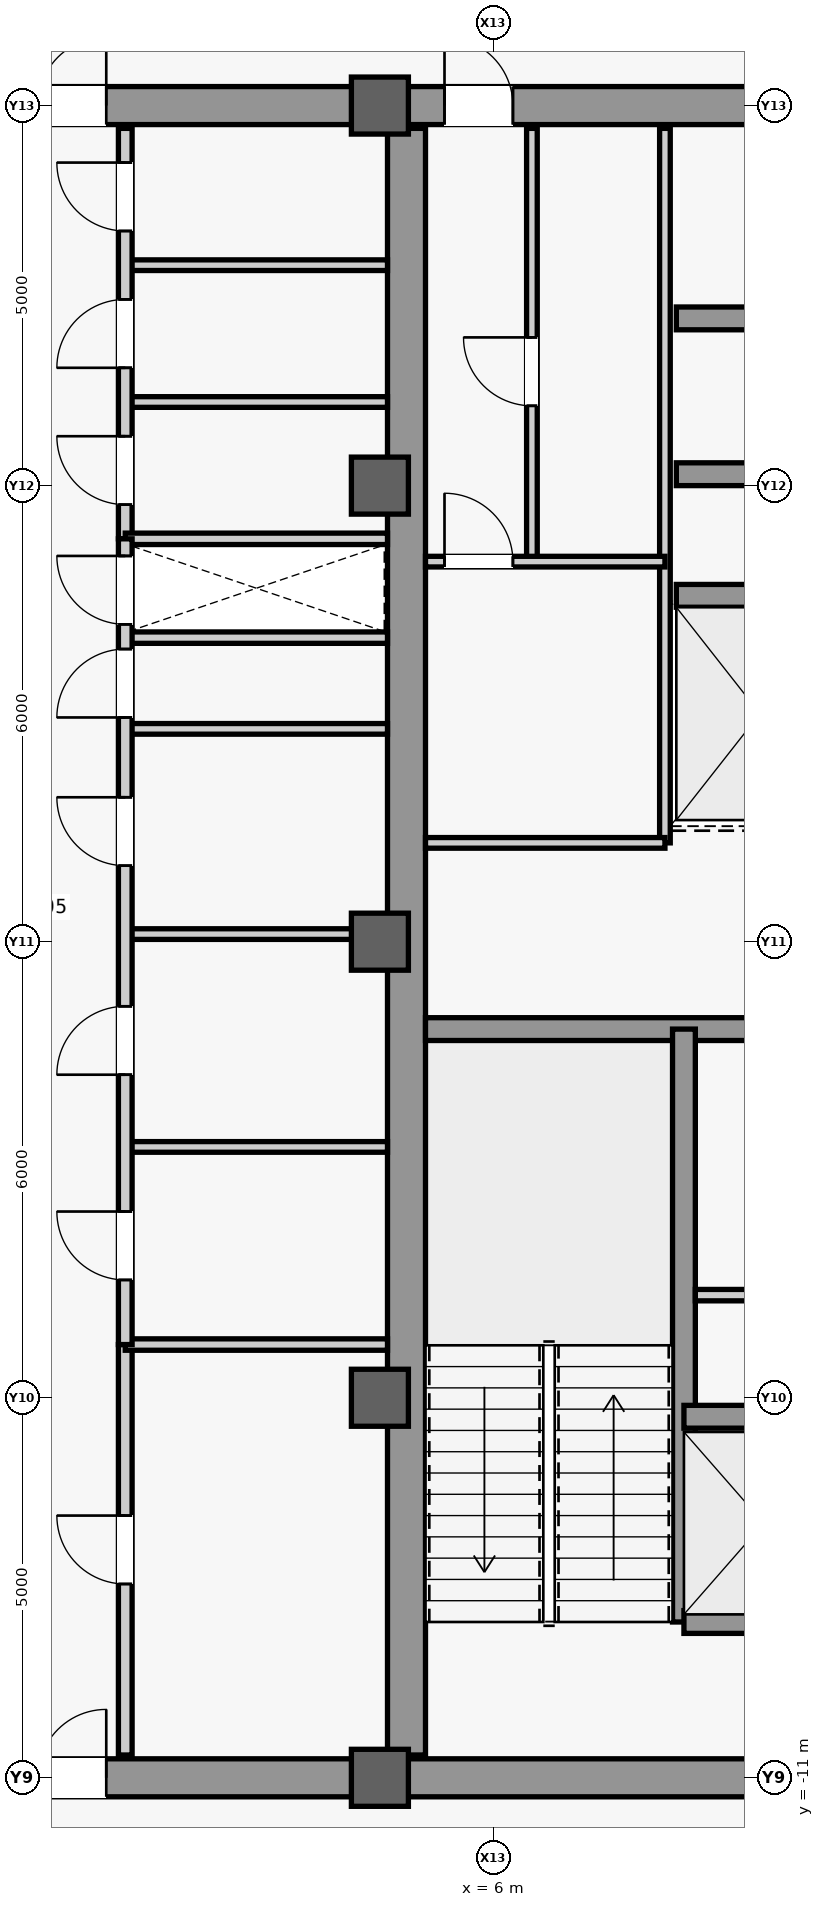
"""IFC4 building model, lengths in metres.
Left out: names, types, materials, properties, quantities, classifications, styles, units other than length and angle.
Written with IfcOpenShell. Run it as: python <this file> out.ifc"""

import sys

from ifc_helpers import new_model, si_unit, direction, frame, frame_2d, origin, origin_2d, place, context, subcontext, project, spatial, rectangle, extrude, source, transform, mapped, element, fill, save


model = new_model("IFC4")
c1 = context("Model", 3, precision=1e-05, world=origin(), true_north=direction((0.0, 1.0)))
c2 = subcontext(c1, "Body", "Model", "MODEL_VIEW")
j1 = project(units=[si_unit("LENGTHUNIT", "METRE"), si_unit("PLANEANGLEUNIT", "RADIAN")], contexts=[c1])
p1 = place(None, origin())
s1 = spatial("IfcSite", under=j1, at=p1, CompositionType="ELEMENT")
p2 = place(p1, origin())
s2 = spatial("IfcBuilding", under=s1, at=p2, CompositionType="ELEMENT")
p3 = place(p2, frame((0.0, 0.0, 394.7)))
s3 = spatial("IfcBuildingStorey", under=s2, at=p3, CompositionType="ELEMENT", Elevation=394.7)
m1 = source(origin(), c2, "Body", "SweptSolid", [
    extrude(rectangle(XDim=21.4, YDim=0.5, at=frame_2d((10.7, 0.0))), origin(), (0.0, 0.0, 1.0), 4.45),
])
p4 = place(p3, frame((4.85, -10.7, 0.0), z_axis=(0.0, 0.0, 1.0), x_axis=(0.0, 1.0, 0.0)))
e1 = element("IfcWall", 1, at=p4, inside=s3, PredefinedType="SHEAR", context=c2, shape_type="MappedRepresentation", body=[
    mapped(m1, transform((0.0, 0.0, 0.0), scale=1.0)),
])
m2 = source(origin(), c2, "Body", "SweptSolid", [
    extrude(rectangle(XDim=5.9, YDim=0.5, at=frame_2d((2.95, 0.0))), origin(), (0.0, 0.0, 1.0), 4.45),
])
p5 = place(p3, frame((4.85, -11.0, 0.0), z_axis=(0.0, 0.0, 1.0), x_axis=(1.0, 0.0, 0.0)))
e2 = element("IfcWall", 2, at=p5, inside=s3, PredefinedType="SHEAR", context=c2, shape_type="MappedRepresentation", body=[
    mapped(m2, transform((0.0, 0.0, 0.0), scale=1.0)),
])
p6 = place(p3, frame((4.85, 11.0, 0.0), z_axis=(0.0, 0.0, 1.0), x_axis=(1.0, 0.0, 0.0)))
e3 = element("IfcWall", 3, at=p6, inside=s3, PredefinedType="SHEAR", context=c2, shape_type="MappedRepresentation", body=[
    mapped(m2, transform((0.0, 0.0, 0.0), scale=1.0)),
])
m3 = source(origin(), c2, "Body", "SweptSolid", [
    extrude(rectangle(XDim=0.9, YDim=2.15, at=frame_2d((0.45, 1.075))), frame((0.0, 0.26, 0.0), z_axis=(0.0, -1.0, 0.0), x_axis=(1.0, 0.0, 0.0)), (0.0, 0.0, 1.0), 0.52),
])
p7 = place(p6, frame((0.5, 0.0, 0.0)))
e4 = element("IfcOpeningElement", 4, at=p7, cuts=e3, PredefinedType="OPENING", context=c2, shape_type="MappedRepresentation", body=[
    mapped(m3, transform((0.0, 0.0, 0.0), scale=1.0)),
])
m4 = source(origin(), c2, "Body", "SweptSolid", [
    extrude(rectangle(XDim=5.65, YDim=0.3, at=frame_2d((2.825, 0.0))), origin(), (0.0, 0.0, 1.0), 4.45),
])
p8 = place(p3, frame((5.1, -1.15, 0.0), z_axis=(0.0, 0.0, 1.0), x_axis=(1.0, 0.0, 0.0)))
e5 = element("IfcWall", 5, at=p8, inside=s3, PredefinedType="SHEAR", context=c2, shape_type="MappedRepresentation", body=[
    mapped(m4, transform((0.0, 0.0, 0.0), scale=1.0)),
])
m5 = source(origin(), c2, "Body", "SweptSolid", [
    extrude(rectangle(XDim=9.2, YDim=0.5, at=frame_2d((4.6, 0.0))), origin(), (0.0, 0.0, 1.0), 4.45),
])
p9 = place(p3, frame((-4.6, -11.0, 0.0), z_axis=(0.0, 0.0, 1.0), x_axis=(1.0, 0.0, 0.0)))
e6 = element("IfcWall", 6, at=p9, inside=s3, PredefinedType="SHEAR", context=c2, shape_type="MappedRepresentation", body=[
    mapped(m5, transform((0.0, 0.0, 0.0), scale=1.0)),
])
m6 = source(origin(), c2, "Body", "SweptSolid", [
    extrude(rectangle(XDim=1.8, YDim=2.25, at=frame_2d((0.9, 1.125))), frame((0.0, 0.26, 0.0), z_axis=(0.0, -1.0, 0.0), x_axis=(1.0, 0.0, 0.0)), (0.0, 0.0, 1.0), 0.52),
])
p10 = place(p9, frame((3.7, 0.0, 0.0)))
e7 = element("IfcOpeningElement", 7, at=p10, cuts=e6, PredefinedType="OPENING", context=c2, shape_type="MappedRepresentation", body=[
    mapped(m6, transform((0.0, 0.0, 0.0), scale=1.0)),
])
p11 = place(p3, frame((-4.6, 11.0, 0.0), z_axis=(0.0, 0.0, 1.0), x_axis=(1.0, 0.0, 0.0)))
e8 = element("IfcWall", 8, at=p11, inside=s3, PredefinedType="SHEAR", context=c2, shape_type="MappedRepresentation", body=[
    mapped(m5, transform((0.0, 0.0, 0.0), scale=1.0)),
])
p12 = place(p11, frame((3.7, 0.0, 0.0)))
e9 = element("IfcOpeningElement", 9, at=p12, cuts=e8, PredefinedType="OPENING", context=c2, shape_type="MappedRepresentation", body=[
    mapped(m6, transform((0.0, 0.0, 0.0), scale=1.0)),
])
m7 = source(origin(), c2, "Body", "SweptSolid", [
    extrude(rectangle(XDim=0.75, YDim=0.75, at=origin_2d()), origin(), (0.0, 0.0, 1.0), 4.8),
])
for number, where, z_axis, x_axis in (
    (10, (4.5, -11.0, 0.0), (0.0, 0.0, 1.0), (1.0, 0.0, 0.0)),
    (11, (4.5, -6.0, 0.0), (0.0, 0.0, 1.0), (1.0, 0.0, 0.0)),
    (12, (4.5, 0.0, 0.0), (0.0, 0.0, 1.0), (1.0, 0.0, 0.0)),
    (13, (4.5, 6.0, 0.0), (0.0, 0.0, 1.0), (1.0, 0.0, 0.0)),
    (14, (4.5, 11.0, 0.0), (0.0, 0.0, 1.0), (1.0, 0.0, 0.0)),
):
    element("IfcColumn", number, at=place(p3, frame(where, z_axis=z_axis, x_axis=x_axis)), inside=s3, PredefinedType="COLUMN", context=c2, shape_type="MappedRepresentation", body=[
        mapped(m7, transform((0.0, 0.0, 0.0), scale=1.0)),
    ])
m8 = source(origin(), c2, "Body", "SweptSolid", [
    extrude(rectangle(XDim=7.8, YDim=0.3, at=frame_2d((3.9, 0.0))), origin(), (0.0, 0.0, 1.0), 4.45),
])
p13 = place(p3, frame((8.5, -8.95, 0.0), z_axis=(0.0, 0.0, 1.0), x_axis=(0.0, 1.0, 0.0)))
e15 = element("IfcWall", 15, at=p13, inside=s3, PredefinedType="SHEAR", context=c2, shape_type="MappedRepresentation", body=[
    mapped(m8, transform((0.0, 0.0, 0.0), scale=1.0)),
])
m9 = source(origin(), c2, "Body", "SweptSolid", [
    extrude(rectangle(XDim=2.2, YDim=0.3, at=frame_2d((1.1, 0.0))), origin(), (0.0, 0.0, 1.0), 4.45),
])
for number, where, z_axis, x_axis in (
    (16, (8.5, -8.95, 0.0), (0.0, 0.0, 1.0), (1.0, 0.0, 0.0)),
    (17, (8.5, -6.25, 0.0), (0.0, 0.0, 1.0), (1.0, 0.0, 0.0)),
):
    element("IfcWall", number, at=place(p3, frame(where, z_axis=z_axis, x_axis=x_axis)), inside=s3, PredefinedType="SHEAR", context=c2, shape_type="MappedRepresentation", body=[
        mapped(m9, transform((0.0, 0.0, 0.0), scale=1.0)),
    ])
m10 = source(origin(), c2, "Body", "SweptSolid", [
    extrude(rectangle(XDim=2.3, YDim=0.3, at=frame_2d((1.15, 0.0))), origin(), (0.0, 0.0, 1.0), 4.45),
])
for number, where, z_axis, x_axis in (
    (18, (8.4, 4.55, 0.0), (0.0, 0.0, 1.0), (1.0, 0.0, 0.0)),
    (19, (8.4, 6.15, 0.0), (0.0, 0.0, 1.0), (1.0, 0.0, 0.0)),
    (20, (8.4, 8.2, 0.0), (0.0, 0.0, 1.0), (1.0, 0.0, 0.0)),
):
    element("IfcWall", number, at=place(p3, frame(where, z_axis=z_axis, x_axis=x_axis)), inside=s3, PredefinedType="SHEAR", context=c2, shape_type="MappedRepresentation", body=[
        mapped(m10, transform((0.0, 0.0, 0.0), scale=1.0)),
    ])
m11 = source(origin(), c2, "Body", "SweptSolid", [
    extrude(rectangle(XDim=2.05, YDim=0.15, at=frame_2d((1.025, 0.0))), origin(), (0.0, 0.0, 1.0), 4.45),
])
p14 = place(p3, frame((8.65, -4.65, 0.0), z_axis=(0.0, 0.0, 1.0), x_axis=(1.0, 0.0, 0.0)))
e21 = element("IfcWall", 21, at=p14, inside=s3, PredefinedType="PARTITIONING", context=c2, shape_type="MappedRepresentation", body=[
    mapped(m11, transform((0.0, 0.0, 0.0), scale=1.0)),
])
m12 = source(origin(), c2, "Body", "SweptSolid", [
    extrude(rectangle(XDim=9.4, YDim=0.14, at=frame_2d((4.7, 0.0))), origin(), (0.0, 0.0, 1.0), 4.45),
])
p15 = place(p3, frame((8.25, 1.3, 0.0), z_axis=(0.0, 0.0, 1.0), x_axis=(0.0, 1.0, 0.0)))
e22 = element("IfcWall", 22, at=p15, inside=s3, PredefinedType="PARTITIONING", context=c2, shape_type="MappedRepresentation", body=[
    mapped(m12, transform((0.0, 0.0, 0.0), scale=1.0)),
])
m13 = source(origin(), c2, "Body", "SweptSolid", [
    extrude(rectangle(XDim=3.15, YDim=0.14, at=frame_2d((1.575, 0.0))), origin(), (0.0, 0.0, 1.0), 4.45),
])
p16 = place(p3, frame((5.1, 1.3, 0.0), z_axis=(0.0, 0.0, 1.0), x_axis=(1.0, 0.0, 0.0)))
e23 = element("IfcWall", 23, at=p16, inside=s3, PredefinedType="PARTITIONING", context=c2, shape_type="MappedRepresentation", body=[
    mapped(m13, transform((0.0, 0.0, 0.0), scale=1.0)),
])
m14 = source(origin(), c2, "Body", "SweptSolid", [
    extrude(rectangle(XDim=5.7, YDim=0.14, at=frame_2d((2.85, 0.0))), origin(), (0.0, 0.0, 1.0), 4.45),
])
p17 = place(p3, frame((6.5, 5.0, 0.0), z_axis=(0.0, 0.0, 1.0), x_axis=(0.0, 1.0, 0.0)))
e24 = element("IfcWall", 24, at=p17, inside=s3, PredefinedType="PARTITIONING", context=c2, shape_type="MappedRepresentation", body=[
    mapped(m14, transform((0.0, 0.0, 0.0), scale=1.0)),
])
m15 = source(origin(), c2, "Body", "SweptSolid", [
    extrude(rectangle(XDim=0.9, YDim=2.15, at=frame_2d((0.45, 1.075))), frame((0.0, 0.08, 0.0), z_axis=(0.0, -1.0, 0.0), x_axis=(1.0, 0.0, 0.0)), (0.0, 0.0, 1.0), 0.16),
])
p18 = place(p17, frame((2.05, 0.0, 0.0)))
e25 = element("IfcOpeningElement", 25, at=p18, cuts=e24, PredefinedType="OPENING", context=c2, shape_type="MappedRepresentation", body=[
    mapped(m15, transform((0.0, 0.0, 0.0), scale=1.0)),
])
p19 = place(p3, frame((5.1, 5.0, 0.0), z_axis=(0.0, 0.0, 1.0), x_axis=(1.0, 0.0, 0.0)))
e26 = element("IfcWall", 26, at=p19, inside=s3, PredefinedType="PARTITIONING", context=c2, shape_type="MappedRepresentation", body=[
    mapped(m13, transform((0.0, 0.0, 0.0), scale=1.0)),
])
p20 = place(p19, frame((0.25, 0.0, 0.0)))
e27 = element("IfcOpeningElement", 27, at=p20, cuts=e26, PredefinedType="OPENING", context=c2, shape_type="MappedRepresentation", body=[
    mapped(m15, transform((0.0, 0.0, 0.0), scale=1.0)),
])
m16 = source(origin(), c2, "Body", "SweptSolid", [
    extrude(rectangle(XDim=3.45, YDim=0.15, at=frame_2d((1.725, 0.0))), origin(), (0.0, 0.0, 1.0), 4.45),
])
p21 = place(p3, frame((1.15, 4.0, 0.0), z_axis=(0.0, 0.0, 1.0), x_axis=(1.0, 0.0, 0.0)))
e28 = element("IfcWall", 28, at=p21, inside=s3, PredefinedType="PARTITIONING", context=c2, shape_type="MappedRepresentation", body=[
    mapped(m16, transform((0.0, 0.0, 0.0), scale=1.0)),
])
m17 = source(origin(), c2, "Body", "SweptSolid", [
    extrude(rectangle(XDim=5.4, YDim=0.18, at=frame_2d((2.7, 0.0))), origin(), (0.0, 0.0, 1.0), 4.45),
])
p22 = place(p3, frame((1.15, -10.7, 0.0), z_axis=(0.0, 0.0, 1.0), x_axis=(0.0, 1.0, 0.0)))
e29 = element("IfcWall", 29, at=p22, inside=s3, PredefinedType="PARTITIONING", context=c2, shape_type="MappedRepresentation", body=[
    mapped(m17, transform((0.0, 0.0, 0.0), scale=1.0)),
])
m18 = source(origin(), c2, "Body", "SweptSolid", [
    extrude(rectangle(XDim=0.9, YDim=2.15, at=frame_2d((0.45, 1.075))), frame((0.0, 0.1, 0.0), z_axis=(0.0, -1.0, 0.0), x_axis=(1.0, 0.0, 0.0)), (0.0, 0.0, 1.0), 0.2),
])
p23 = place(p22, frame((2.25, 0.0, 0.0)))
e30 = element("IfcOpeningElement", 30, at=p23, cuts=e29, PredefinedType="OPENING", context=c2, shape_type="MappedRepresentation", body=[
    mapped(m18, transform((0.0, 0.0, 0.0), scale=1.0)),
])
p24 = place(p3, frame((1.15, -5.3, 0.0), z_axis=(0.0, 0.0, 1.0), x_axis=(1.0, 0.0, 0.0)))
e31 = element("IfcWall", 31, at=p24, inside=s3, PredefinedType="PARTITIONING", context=c2, shape_type="MappedRepresentation", body=[
    mapped(m16, transform((0.0, 0.0, 0.0), scale=1.0)),
])
m19 = source(origin(), c2, "Body", "SweptSolid", [
    extrude(rectangle(XDim=3.45, YDim=0.14, at=frame_2d((1.725, 0.0))), origin(), (0.0, 0.0, 1.0), 4.45),
])
for number, where, z_axis, x_axis in (
    (32, (1.15, 7.1, 0.0), (0.0, 0.0, 1.0), (1.0, 0.0, 0.0)),
    (33, (1.15, 8.9, 0.0), (0.0, 0.0, 1.0), (1.0, 0.0, 0.0)),
):
    element("IfcWall", number, at=place(p3, frame(where, z_axis=z_axis, x_axis=x_axis)), inside=s3, PredefinedType="PARTITIONING", context=c2, shape_type="MappedRepresentation", body=[
        mapped(m19, transform((0.0, 0.0, 0.0), scale=1.0)),
    ])
p25 = place(p3, frame((1.15, 5.3, 0.0), z_axis=(0.0, 0.0, 1.0), x_axis=(0.0, 1.0, 0.0)))
e34 = element("IfcWall", 34, at=p25, inside=s3, PredefinedType="PARTITIONING", context=c2, shape_type="MappedRepresentation", body=[
    mapped(m17, transform((0.0, 0.0, 0.0), scale=1.0)),
])
p26 = place(p25, frame((0.45, 0.0, 0.0)))
e35 = element("IfcOpeningElement", 35, at=p26, cuts=e34, PredefinedType="OPENING", context=c2, shape_type="MappedRepresentation", body=[
    mapped(m18, transform((0.0, 0.0, 0.0), scale=1.0)),
])
p27 = place(p25, frame((2.25, 0.0, 0.0)))
e36 = element("IfcOpeningElement", 36, at=p27, cuts=e34, PredefinedType="OPENING", context=c2, shape_type="MappedRepresentation", body=[
    mapped(m18, transform((0.0, 0.0, 0.0), scale=1.0)),
])
p28 = place(p25, frame((4.05, 0.0, 0.0)))
e37 = element("IfcOpeningElement", 37, at=p28, cuts=e34, PredefinedType="OPENING", context=c2, shape_type="MappedRepresentation", body=[
    mapped(m18, transform((0.0, 0.0, 0.0), scale=1.0)),
])
p29 = place(p3, frame((1.15, 5.3, 0.0), z_axis=(0.0, 0.0, 1.0), x_axis=(1.0, 0.0, 0.0)))
e38 = element("IfcWall", 38, at=p29, inside=s3, PredefinedType="PARTITIONING", context=c2, shape_type="MappedRepresentation", body=[
    mapped(m16, transform((0.0, 0.0, 0.0), scale=1.0)),
])
p30 = place(p3, frame((1.15, -2.7, 0.0), z_axis=(0.0, 0.0, 1.0), x_axis=(1.0, 0.0, 0.0)))
e39 = element("IfcWall", 39, at=p30, inside=s3, PredefinedType="PARTITIONING", context=c2, shape_type="MappedRepresentation", body=[
    mapped(m19, transform((0.0, 0.0, 0.0), scale=1.0)),
])
m20 = source(origin(), c2, "Body", "SweptSolid", [
    extrude(rectangle(XDim=3.45, YDim=0.14, at=frame_2d((1.725, 0.0))), origin(), (0.0, 0.0, 1.0), 3.755),
])
p31 = place(p3, frame((1.15, 0.1, 0.0), z_axis=(0.0, 0.0, 1.0), x_axis=(1.0, 0.0, 0.0)))
e40 = element("IfcWall", 40, at=p31, inside=s3, PredefinedType="PARTITIONING", context=c2, shape_type="MappedRepresentation", body=[
    mapped(m20, transform((0.0, 0.0, 0.0), scale=1.0)),
])
p32 = place(p3, frame((1.15, 2.8, 0.0), z_axis=(0.0, 0.0, 1.0), x_axis=(1.0, 0.0, 0.0)))
e41 = element("IfcWall", 41, at=p32, inside=s3, PredefinedType="PARTITIONING", context=c2, shape_type="MappedRepresentation", body=[
    mapped(m19, transform((0.0, 0.0, 0.0), scale=1.0)),
])
m21 = source(origin(), c2, "Body", "SweptSolid", [
    extrude(rectangle(XDim=10.6, YDim=0.18, at=frame_2d((5.3, 0.0))), origin(), (0.0, 0.0, 1.0), 4.45),
])
p33 = place(p3, frame((1.15, -5.3, 0.0), z_axis=(0.0, 0.0, 1.0), x_axis=(0.0, 1.0, 0.0)))
e42 = element("IfcWall", 42, at=p33, inside=s3, PredefinedType="PARTITIONING", context=c2, shape_type="MappedRepresentation", body=[
    mapped(m21, transform((0.0, 0.0, 0.0), scale=1.0)),
])
p34 = place(p33, frame((0.85, 0.0, 0.0)))
e43 = element("IfcOpeningElement", 43, at=p34, cuts=e42, PredefinedType="OPENING", context=c2, shape_type="MappedRepresentation", body=[
    mapped(m18, transform((0.0, 0.0, 0.0), scale=1.0)),
])
p35 = place(p33, frame((3.55, 0.0, 0.0)))
e44 = element("IfcOpeningElement", 44, at=p35, cuts=e42, PredefinedType="OPENING", context=c2, shape_type="MappedRepresentation", body=[
    mapped(m18, transform((0.0, 0.0, 0.0), scale=1.0)),
])
p36 = place(p33, frame((6.3, 0.0, 0.0)))
e45 = element("IfcOpeningElement", 45, at=p36, cuts=e42, PredefinedType="OPENING", context=c2, shape_type="MappedRepresentation", body=[
    mapped(m18, transform((0.0, 0.0, 0.0), scale=1.0)),
])
p37 = place(p33, frame((8.25, 0.0, 0.0)))
e46 = element("IfcOpeningElement", 46, at=p37, cuts=e42, PredefinedType="OPENING", context=c2, shape_type="MappedRepresentation", body=[
    mapped(m18, transform((0.0, 0.0, 0.0), scale=1.0)),
])
p38 = place(p33, frame((9.475, 0.0, 0.0)))
e47 = element("IfcOpeningElement", 47, at=p38, cuts=e42, PredefinedType="OPENING", context=c2, shape_type="MappedRepresentation", body=[
    mapped(m18, transform((0.0, 0.0, 0.0), scale=1.0)),
])
m22 = source(origin(), c2, "Body", "SweptSolid", [
    extrude(rectangle(XDim=0.9, YDim=2.15, at=frame_2d((0.45, 1.075))), frame((0.0, 0.025, 0.0), z_axis=(0.0, -1.0, 0.0), x_axis=(1.0, 0.0, 0.0)), (0.0, 0.0, 1.0), 0.05),
])
p39 = place(p7, origin())
e48 = element("IfcDoor", 48, at=p39, inside=s3, OperationType="SINGLE_SWING_LEFT", PredefinedType="DOOR", context=c2, shape_type="MappedRepresentation", body=[
    mapped(m22, transform((0.0, 0.0, 0.0), scale=1.0)),
])
fill(e4, e48)
p40 = place(p18, origin())
e49 = element("IfcDoor", 49, at=p40, inside=s3, OperationType="SINGLE_SWING_RIGHT", PredefinedType="DOOR", context=c2, shape_type="MappedRepresentation", body=[
    mapped(m22, transform((0.0, 0.0, 0.0), scale=1.0)),
])
fill(e25, e49)
p41 = place(p20, origin())
e50 = element("IfcDoor", 50, at=p41, inside=s3, OperationType="SINGLE_SWING_LEFT", PredefinedType="DOOR", context=c2, shape_type="MappedRepresentation", body=[
    mapped(m22, transform((0.0, 0.0, 0.0), scale=1.0)),
])
fill(e27, e50)
p42 = place(p23, origin())
e51 = element("IfcDoor", 51, at=p42, inside=s3, OperationType="SINGLE_SWING_RIGHT", PredefinedType="DOOR", context=c2, shape_type="MappedRepresentation", body=[
    mapped(m22, transform((0.0, 0.0, 0.0), scale=1.0)),
])
fill(e30, e51)
m23 = source(origin(), c2, "Body", "SweptSolid", [
    extrude(rectangle(XDim=1.8, YDim=2.25, at=frame_2d((0.9, 1.125))), frame((0.0, 0.025, 0.0), z_axis=(0.0, -1.0, 0.0), x_axis=(1.0, 0.0, 0.0)), (0.0, 0.0, 1.0), 0.05),
])
p43 = place(p10, origin())
e52 = element("IfcDoor", 52, at=p43, inside=s3, OperationType="SINGLE_SWING_LEFT", PredefinedType="DOOR", context=c2, shape_type="MappedRepresentation", body=[
    mapped(m23, transform((0.0, 0.0, 0.0), scale=1.0)),
])
fill(e7, e52)
p44 = place(p26, origin())
e53 = element("IfcDoor", 53, at=p44, inside=s3, OperationType="SINGLE_SWING_RIGHT", PredefinedType="DOOR", context=c2, shape_type="MappedRepresentation", body=[
    mapped(m22, transform((0.0, 0.0, 0.0), scale=1.0)),
])
fill(e35, e53)
p45 = place(p27, origin())
e54 = element("IfcDoor", 54, at=p45, inside=s3, OperationType="SINGLE_SWING_LEFT", PredefinedType="DOOR", context=c2, shape_type="MappedRepresentation", body=[
    mapped(m22, transform((0.0, 0.0, 0.0), scale=1.0)),
])
fill(e36, e54)
p46 = place(p28, origin())
e55 = element("IfcDoor", 55, at=p46, inside=s3, OperationType="SINGLE_SWING_RIGHT", PredefinedType="DOOR", context=c2, shape_type="MappedRepresentation", body=[
    mapped(m22, transform((0.0, 0.0, 0.0), scale=1.0)),
])
fill(e37, e55)
p47 = place(p12, origin())
e56 = element("IfcDoor", 56, at=p47, inside=s3, OperationType="SINGLE_SWING_RIGHT", PredefinedType="DOOR", context=c2, shape_type="MappedRepresentation", body=[
    mapped(m23, transform((0.0, 0.0, 0.0), scale=1.0)),
])
fill(e9, e56)
p48 = place(p34, origin())
e57 = element("IfcDoor", 57, at=p48, inside=s3, OperationType="SINGLE_SWING_RIGHT", PredefinedType="DOOR", context=c2, shape_type="MappedRepresentation", body=[
    mapped(m22, transform((0.0, 0.0, 0.0), scale=1.0)),
])
fill(e43, e57)
p49 = place(p35, origin())
e58 = element("IfcDoor", 58, at=p49, inside=s3, OperationType="SINGLE_SWING_LEFT", PredefinedType="DOOR", context=c2, shape_type="MappedRepresentation", body=[
    mapped(m22, transform((0.0, 0.0, 0.0), scale=1.0)),
])
fill(e44, e58)
p50 = place(p36, origin())
e59 = element("IfcDoor", 59, at=p50, inside=s3, OperationType="SINGLE_SWING_RIGHT", PredefinedType="DOOR", context=c2, shape_type="MappedRepresentation", body=[
    mapped(m22, transform((0.0, 0.0, 0.0), scale=1.0)),
])
fill(e45, e59)
p51 = place(p37, origin())
e60 = element("IfcDoor", 60, at=p51, inside=s3, OperationType="SINGLE_SWING_LEFT", PredefinedType="DOOR", context=c2, shape_type="MappedRepresentation", body=[
    mapped(m22, transform((0.0, 0.0, 0.0), scale=1.0)),
])
fill(e46, e60)
p52 = place(p38, origin())
e61 = element("IfcDoor", 61, at=p52, inside=s3, OperationType="SINGLE_SWING_RIGHT", PredefinedType="DOOR", context=c2, shape_type="MappedRepresentation", body=[
    mapped(m22, transform((0.0, 0.0, 0.0), scale=1.0)),
])
fill(e47, e61)
save(model, sys.argv[1])
